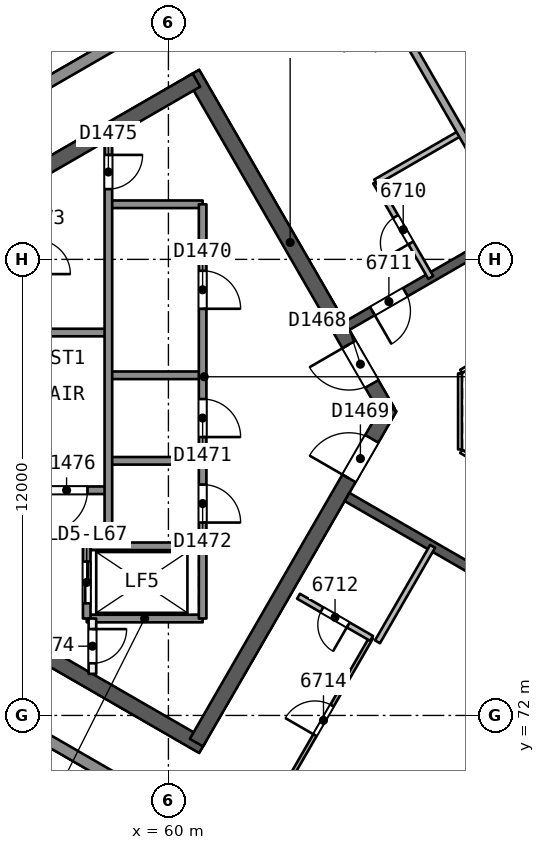
"""IFC4 building model, lengths in metres.
Left out: names, types, materials, properties, quantities, classifications, styles, units other than length and angle.
Written with IfcOpenShell. Run it as: python <this file> out.ifc"""

import sys

from ifc_helpers import new_model, si_unit, direction, frame, frame_2d, origin, place, context, subcontext, project, spatial, rectangle, extrude, element, fill, save


model = new_model("IFC4")
c1 = context("Model", 3, precision=1e-05, world=origin(), true_north=direction((0.0, 1.0)))
c2 = subcontext(c1, "Body", "Model", "MODEL_VIEW")
j1 = project(units=[si_unit("LENGTHUNIT", "METRE"), si_unit("PLANEANGLEUNIT", "RADIAN")], contexts=[c1])
p1 = place(None, origin())
s1 = spatial("IfcSite", under=j1, at=p1, CompositionType="ELEMENT")
p2 = place(p1, origin())
s2 = spatial("IfcBuilding", under=s1, at=p2, CompositionType="ELEMENT")
p3 = place(p2, frame((0.0, 0.0, 273.8)))
s3 = spatial("IfcBuildingStorey", under=s2, at=p3, CompositionType="ELEMENT", Elevation=273.8)
p4 = place(p3, frame((65.769, 80.0, 0.0), z_axis=(0.0, 0.0, 1.0), x_axis=(-0.50000177223, 0.866024380585, 0.0)))
e1 = element("IfcWall", 1, at=p4, inside=s3, PredefinedType="SHEAR", context=c2, shape_type="SweptSolid", body=[
    extrude(rectangle(XDim=10.265, YDim=0.4, at=frame_2d((5.132, 0.0))), origin(), (0.0, 0.0, 1.0), 3.7),
])
p5 = place(p4, frame((0.834, 0.0, 0.0)))
e2 = element("IfcOpeningElement", 2, at=p5, cuts=e1, PredefinedType="OPENING", context=c2, shape_type="SweptSolid", body=[
    extrude(rectangle(XDim=1.2, YDim=2.1, at=frame_2d((0.6, 1.05))), frame((0.0, 0.21, 0.0), z_axis=(0.0, -1.0, 0.0), x_axis=(1.0, 0.0, 0.0)), (0.0, 0.0, 1.0), 0.421),
])
p6 = place(p3, frame((60.737, 88.716, 0.0), z_axis=(0.0, 0.0, 1.0), x_axis=(-0.866028812667, -0.499994095595, 0.0)))
e3 = element("IfcWall", 3, at=p6, inside=s3, PredefinedType="SHEAR", context=c2, shape_type="SweptSolid", body=[
    extrude(rectangle(XDim=14.134, YDim=0.4, at=frame_2d((7.067, 0.0))), origin(), (0.0, 0.0, 1.0), 3.7),
])
p7 = place(p3, frame((48.597, 78.293, 0.0), z_axis=(0.0, 0.0, 1.0), x_axis=(0.866026024469, -0.499998924941, 0.0)))
e4 = element("IfcWall", 4, at=p7, inside=s3, PredefinedType="SHEAR", context=c2, shape_type="SweptSolid", body=[
    extrude(rectangle(XDim=14.218, YDim=0.4, at=frame_2d((7.109, 0.0))), origin(), (0.0, 0.0, 1.0), 3.7),
])
p8 = place(p3, frame((60.737, 71.284, 0.0), z_axis=(0.0, 0.0, 1.0), x_axis=(0.50000547566, 0.866022242388, 0.0)))
e5 = element("IfcWall", 5, at=p8, inside=s3, PredefinedType="SHEAR", context=c2, shape_type="SweptSolid", body=[
    extrude(rectangle(XDim=10.18, YDim=0.4, at=frame_2d((5.09, 0.0))), origin(), (0.0, 0.0, 1.0), 3.7),
])
p9 = place(p8, frame((8.03, 0.0, 0.0)))
e6 = element("IfcOpeningElement", 6, at=p9, cuts=e5, PredefinedType="OPENING", context=c2, shape_type="SweptSolid", body=[
    extrude(rectangle(XDim=1.2, YDim=2.1, at=frame_2d((0.6, 1.05))), frame((0.0, 0.21, 0.0), z_axis=(0.0, -1.0, 0.0), x_axis=(1.0, 0.0, 0.0)), (0.0, 0.0, 1.0), 0.421),
])
p10 = place(p3, frame((78.2, 90.046, 0.0), z_axis=(0.0, 0.0, 1.0), x_axis=(-0.866026492143, -0.499998114903, 0.0)))
e7 = element("IfcWall", 7, at=p10, inside=s3, PredefinedType="SHEAR", context=c2, shape_type="SweptSolid", body=[
    extrude(rectangle(XDim=15.588, YDim=0.25, at=frame_2d((7.794, 0.0))), origin(), (0.0, 0.0, 1.0), 3.3),
])
p11 = place(p10, frame((3.372, 0.0, 0.0)))
e8 = element("IfcOpeningElement", 8, at=p11, cuts=e7, PredefinedType="OPENING", context=c2, shape_type="SweptSolid", body=[
    extrude(rectangle(XDim=1.0, YDim=2.1, at=frame_2d((0.5, 1.05))), frame((0.0, 0.135, 0.0), z_axis=(0.0, -1.0, 0.0), x_axis=(1.0, 0.0, 0.0)), (0.0, 0.0, 1.0), 0.271),
])
p12 = place(p10, frame((8.594, 0.0, 0.0)))
e9 = element("IfcOpeningElement", 9, at=p12, cuts=e7, PredefinedType="OPENING", context=c2, shape_type="SweptSolid", body=[
    extrude(rectangle(XDim=1.0, YDim=2.1, at=frame_2d((0.5, 1.05))), frame((0.0, 0.135, 0.0), z_axis=(0.0, -1.0, 0.0), x_axis=(1.0, 0.0, 0.0)), (0.0, 0.0, 1.0), 0.271),
])
p13 = place(p10, frame((13.816, 0.0, 0.0)))
e10 = element("IfcOpeningElement", 10, at=p13, cuts=e7, PredefinedType="OPENING", context=c2, shape_type="SweptSolid", body=[
    extrude(rectangle(XDim=1.0, YDim=2.1, at=frame_2d((0.5, 1.05))), frame((0.0, 0.135, 0.0), z_axis=(0.0, -1.0, 0.0), x_axis=(1.0, 0.0, 0.0)), (0.0, 0.0, 1.0), 0.271),
])
p14 = place(p3, frame((64.7, 77.748, 0.0), z_axis=(0.0, 0.0, 1.0), x_axis=(0.866026492143, -0.499998114903, 0.0)))
e11 = element("IfcWall", 11, at=p14, inside=s3, PredefinedType="SHEAR", context=c2, shape_type="SweptSolid", body=[
    extrude(rectangle(XDim=15.588, YDim=0.25, at=frame_2d((7.794, 0.0))), origin(), (0.0, 0.0, 1.0), 3.3),
])
p15 = place(p14, frame((4.473, 0.0, 0.0)))
e12 = element("IfcOpeningElement", 12, at=p15, cuts=e11, PredefinedType="OPENING", context=c2, shape_type="SweptSolid", body=[
    extrude(rectangle(XDim=1.0, YDim=2.1, at=frame_2d((0.5, 1.05))), frame((0.0, 0.135, 0.0), z_axis=(0.0, -1.0, 0.0), x_axis=(1.0, 0.0, 0.0)), (0.0, 0.0, 1.0), 0.271),
])
p16 = place(p14, frame((13.917, 0.0, 0.0)))
e13 = element("IfcOpeningElement", 13, at=p16, cuts=e11, PredefinedType="OPENING", context=c2, shape_type="SweptSolid", body=[
    extrude(rectangle(XDim=1.1, YDim=2.1, at=frame_2d((0.55, 1.05))), frame((0.0, 0.135, 0.0), z_axis=(0.0, -1.0, 0.0), x_axis=(1.0, 0.0, 0.0)), (0.0, 0.0, 1.0), 0.271),
])
p17 = place(p3, frame((64.49, 92.903, 0.0), z_axis=(0.0, 0.0, 1.0), x_axis=(0.500006376834, -0.866021722086, 0.0)))
e14 = element("IfcWall", 14, at=p17, inside=s3, PredefinedType="PARTITIONING", context=c2, shape_type="SweptSolid", body=[
    extrude(rectangle(XDim=9.329, YDim=0.2, at=frame_2d((4.665, 0.0))), origin(), (0.0, 0.0, 1.0), 3.3),
])
p18 = place(p3, frame((66.903, 83.524, 0.0), z_axis=(0.0, 0.0, 1.0), x_axis=(-0.499987231761, 0.866032775405, 0.0)))
e15 = element("IfcWall", 15, at=p18, inside=s3, PredefinedType="PARTITIONING", context=c2, shape_type="SweptSolid", body=[
    extrude(rectangle(XDim=2.9, YDim=0.15, at=frame_2d((1.45, 0.0))), origin(), (0.0, 0.0, 1.0), 3.3),
])
p19 = place(p18, frame((1.05, 0.0, 0.0)))
e16 = element("IfcOpeningElement", 16, at=p19, cuts=e15, PredefinedType="OPENING", context=c2, shape_type="SweptSolid", body=[
    extrude(rectangle(XDim=0.8, YDim=2.1, at=frame_2d((0.4, 1.05))), frame((0.0, 0.085, 0.0), z_axis=(0.0, -1.0, 0.0), x_axis=(1.0, 0.0, 0.0)), (0.0, 0.0, 1.0), 0.171),
])
p20 = place(p3, frame((65.453, 86.035, 0.0), z_axis=(0.0, 0.0, 1.0), x_axis=(0.866021400173, 0.500006934395, 0.0)))
e17 = element("IfcWall", 17, at=p20, inside=s3, PredefinedType="PARTITIONING", context=c2, shape_type="SweptSolid", body=[
    extrude(rectangle(XDim=2.6, YDim=0.15, at=frame_2d((1.3, 0.0))), origin(), (0.0, 0.0, 1.0), 3.3),
])
p21 = place(p3, frame((62.116, 68.469, 0.0), z_axis=(0.0, 0.0, 1.0), x_axis=(0.499987977232, 0.866032345022, 0.0)))
e18 = element("IfcWall", 18, at=p21, inside=s3, PredefinedType="PARTITIONING", context=c2, shape_type="SweptSolid", body=[
    extrude(rectangle(XDim=6.447, YDim=0.1, at=frame_2d((3.224, 0.0))), origin(), (0.0, 0.0, 1.0), 3.3),
])
p22 = place(p21, frame((3.478, 0.0, 0.0)))
e19 = element("IfcOpeningElement", 19, at=p22, cuts=e18, PredefinedType="OPENING", context=c2, shape_type="SweptSolid", body=[
    extrude(rectangle(XDim=0.9, YDim=2.1, at=frame_2d((0.45, 1.05))), frame((0.0, 0.061, 0.0), z_axis=(0.0, -1.0, 0.0), x_axis=(1.0, 0.0, 0.0)), (0.0, 0.0, 1.0), 0.121),
])
p23 = place(p3, frame((65.347, 74.026, 0.0), z_axis=(0.0, 0.0, 1.0), x_axis=(-0.866042797968, 0.49996987118, 0.0)))
e20 = element("IfcWall", 20, at=p23, inside=s3, PredefinedType="PARTITIONING", context=c2, shape_type="SweptSolid", body=[
    extrude(rectangle(XDim=2.221, YDim=0.15, at=frame_2d((1.11, 0.0))), origin(), (0.0, 0.0, 1.0), 3.3),
])
p24 = place(p23, frame((0.711, 0.0, 0.0)))
e21 = element("IfcOpeningElement", 21, at=p24, cuts=e20, PredefinedType="OPENING", context=c2, shape_type="SweptSolid", body=[
    extrude(rectangle(XDim=0.8, YDim=2.1, at=frame_2d((0.4, 1.05))), frame((0.0, 0.085, 0.0), z_axis=(0.0, -1.0, 0.0), x_axis=(1.0, 0.0, 0.0)), (0.0, 0.0, 1.0), 0.171),
])
p25 = place(p3, frame((66.952, 76.448, 0.0), z_axis=(0.0, 0.0, 1.0), x_axis=(-0.499987231761, -0.866032775405, 0.0)))
e22 = element("IfcWall", 22, at=p25, inside=s3, PredefinedType="PARTITIONING", context=c2, shape_type="SweptSolid", body=[
    extrude(rectangle(XDim=2.9, YDim=0.15, at=frame_2d((1.45, 0.0))), origin(), (0.0, 0.0, 1.0), 3.3),
])
p26 = place(p3, frame((46.067, 82.438, 0.0), z_axis=(0.0, 0.0, 1.0), x_axis=(0.866024153303, 0.50000216589, 0.0)))
e23 = element("IfcWall", 23, at=p26, inside=s3, PredefinedType="SOLIDWALL", context=c2, shape_type="SweptSolid", body=[
    extrude(rectangle(XDim=47.675, YDim=0.3, at=frame_2d((23.837, 0.0))), origin(), (0.0, 0.0, 1.0), 3.3),
])
p27 = place(p26, frame((17.415, 0.0, 0.0)))
e24 = element("IfcOpeningElement", 24, at=p27, cuts=e23, PredefinedType="OPENING", context=c2, shape_type="SweptSolid", body=[
    extrude(rectangle(XDim=2.4, YDim=2.4, at=frame_2d((1.2, 1.2))), frame((0.0, 0.161, 0.0), z_axis=(0.0, -1.0, 0.0), x_axis=(1.0, 0.0, 0.0)), (0.0, 0.0, 1.0), 0.321),
])
p28 = place(p26, frame((22.637, 0.0, 0.0)))
e25 = element("IfcOpeningElement", 25, at=p28, cuts=e23, PredefinedType="OPENING", context=c2, shape_type="SweptSolid", body=[
    extrude(rectangle(XDim=2.4, YDim=2.4, at=frame_2d((1.2, 1.2))), frame((0.0, 0.161, 0.0), z_axis=(0.0, -1.0, 0.0), x_axis=(1.0, 0.0, 0.0)), (0.0, 0.0, 1.0), 0.321),
])
p29 = place(p26, frame((27.859, 0.0, 0.0)))
e26 = element("IfcOpeningElement", 26, at=p29, cuts=e23, PredefinedType="OPENING", context=c2, shape_type="SweptSolid", body=[
    extrude(rectangle(XDim=2.4, YDim=2.4, at=frame_2d((1.2, 1.2))), frame((0.0, 0.161, 0.0), z_axis=(0.0, -1.0, 0.0), x_axis=(1.0, 0.0, 0.0)), (0.0, 0.0, 1.0), 0.321),
])
p30 = place(p3, frame((87.355, 53.724, 0.0), z_axis=(0.0, 0.0, 1.0), x_axis=(-0.866024153303, 0.50000216589, 0.0)))
e27 = element("IfcWall", 27, at=p30, inside=s3, PredefinedType="SOLIDWALL", context=c2, shape_type="SweptSolid", body=[
    extrude(rectangle(XDim=47.675, YDim=0.3, at=frame_2d((23.837, 0.0))), origin(), (0.0, 0.0, 1.0), 3.3),
])
p31 = place(p30, frame((17.415, 0.0, 0.0)))
e28 = element("IfcOpeningElement", 28, at=p31, cuts=e27, PredefinedType="OPENING", context=c2, shape_type="SweptSolid", body=[
    extrude(rectangle(XDim=2.4, YDim=2.4, at=frame_2d((1.2, 1.2))), frame((0.0, 0.161, 0.0), z_axis=(0.0, -1.0, 0.0), x_axis=(1.0, 0.0, 0.0)), (0.0, 0.0, 1.0), 0.321),
])
p32 = place(p30, frame((37.296, 0.0, 0.0)))
e29 = element("IfcOpeningElement", 29, at=p32, cuts=e27, PredefinedType="OPENING", context=c2, shape_type="SweptSolid", body=[
    extrude(rectangle(XDim=2.4, YDim=2.4, at=frame_2d((1.2, 1.2))), frame((0.0, 0.161, 0.0), z_axis=(0.0, -1.0, 0.0), x_axis=(1.0, 0.0, 0.0)), (0.0, 0.0, 1.0), 0.321),
])
p33 = place(p30, frame((24.008, 0.0, 0.0)))
e30 = element("IfcOpeningElement", 30, at=p33, cuts=e27, PredefinedType="OPENING", context=c2, shape_type="SweptSolid", body=[
    extrude(rectangle(XDim=2.4, YDim=2.4, at=frame_2d((1.2, 1.2))), frame((0.0, 0.161, 0.0), z_axis=(0.0, -1.0, 0.0), x_axis=(1.0, 0.0, 0.0)), (0.0, 0.0, 1.0), 0.321),
])
p34 = place(p3, frame((60.9, 85.45, 0.0), z_axis=(0.0, 0.0, 1.0), x_axis=(-1.0, 0.0, 0.0)))
e31 = element("IfcWall", 31, at=p34, inside=s3, PredefinedType="SOLIDWALL", context=c2, shape_type="SweptSolid", body=[
    extrude(rectangle(XDim=2.48, YDim=0.2, at=frame_2d((1.24, 0.0))), origin(), (0.0, 0.0, 1.0), 3.3),
])
p35 = place(p3, frame((58.42, 82.075, 0.0), z_axis=(0.0, 0.0, 1.0), x_axis=(-1.0, 0.0, 0.0)))
e32 = element("IfcWall", 32, at=p35, inside=s3, PredefinedType="SOLIDWALL", context=c2, shape_type="SweptSolid", body=[
    extrude(rectangle(XDim=7.7, YDim=0.2, at=frame_2d((3.85, 0.0))), origin(), (0.0, 0.0, 1.0), 3.3),
])
for number, where, z_axis, x_axis in (
    (33, (60.9, 80.95, 0.0), (0.0, 0.0, 1.0), (-1.0, 0.0, 0.0)),
    (34, (60.9, 78.7, 0.0), (0.0, 0.0, 1.0), (-1.0, 0.0, 0.0)),
):
    element("IfcWall", number, at=place(p3, frame(where, z_axis=z_axis, x_axis=x_axis)), inside=s3, PredefinedType="SOLIDWALL", context=c2, shape_type="SweptSolid", body=[
        extrude(rectangle(XDim=2.48, YDim=0.2, at=frame_2d((1.24, 0.0))), origin(), (0.0, 0.0, 1.0), 3.3),
    ])
p36 = place(p3, frame((58.42, 77.925, 0.0), z_axis=(0.0, 0.0, 1.0), x_axis=(-1.0, 0.0, 0.0)))
e35 = element("IfcWall", 35, at=p36, inside=s3, PredefinedType="SOLIDWALL", context=c2, shape_type="SweptSolid", body=[
    extrude(rectangle(XDim=7.7, YDim=0.2, at=frame_2d((3.85, 0.0))), origin(), (0.0, 0.0, 1.0), 3.3),
])
p37 = place(p36, frame((0.55, 0.0, 0.0)))
e36 = element("IfcOpeningElement", 36, at=p37, cuts=e35, PredefinedType="OPENING", context=c2, shape_type="SweptSolid", body=[
    extrude(rectangle(XDim=1.1, YDim=2.1, at=frame_2d((0.55, 1.05))), frame((0.0, 0.11, 0.0), z_axis=(0.0, -1.0, 0.0), x_axis=(1.0, 0.0, 0.0)), (0.0, 0.0, 1.0), 0.221),
])
for number, where, z_axis, x_axis in (
    (37, (60.9, 76.45, 0.0), (0.0, 0.0, 1.0), (-1.0, 0.0, 0.0)),
    (38, (60.9, 74.55, 0.0), (0.0, 0.0, 1.0), (-1.0, 0.0, 0.0)),
):
    element("IfcWall", number, at=place(p3, frame(where, z_axis=z_axis, x_axis=x_axis)), inside=s3, PredefinedType="SOLIDWALL", context=c2, shape_type="SweptSolid", body=[
        extrude(rectangle(XDim=3.05, YDim=0.2, at=frame_2d((1.525, 0.0))), origin(), (0.0, 0.0, 1.0), 3.3),
    ])
p38 = place(p3, frame((60.9, 85.45, 0.0), z_axis=(0.0, 0.0, 1.0), x_axis=(0.0, -1.0, 0.0)))
e39 = element("IfcWall", 39, at=p38, inside=s3, PredefinedType="SOLIDWALL", context=c2, shape_type="SweptSolid", body=[
    extrude(rectangle(XDim=10.9, YDim=0.2, at=frame_2d((5.45, 0.0))), origin(), (0.0, 0.0, 1.0), 3.3),
])
p39 = place(p38, frame((1.75, 0.0, 0.0)))
e40 = element("IfcOpeningElement", 40, at=p39, cuts=e39, PredefinedType="OPENING", context=c2, shape_type="SweptSolid", body=[
    extrude(rectangle(XDim=1.0, YDim=2.1, at=frame_2d((0.5, 1.05))), frame((0.0, 0.11, 0.0), z_axis=(0.0, -1.0, 0.0), x_axis=(1.0, 0.0, 0.0)), (0.0, 0.0, 1.0), 0.221),
])
p40 = place(p38, frame((5.125, 0.0, 0.0)))
e41 = element("IfcOpeningElement", 41, at=p40, cuts=e39, PredefinedType="OPENING", context=c2, shape_type="SweptSolid", body=[
    extrude(rectangle(XDim=1.0, YDim=2.1, at=frame_2d((0.5, 1.05))), frame((0.0, 0.11, 0.0), z_axis=(0.0, -1.0, 0.0), x_axis=(1.0, 0.0, 0.0)), (0.0, 0.0, 1.0), 0.221),
])
p41 = place(p38, frame((7.375, 0.0, 0.0)))
e42 = element("IfcOpeningElement", 42, at=p41, cuts=e39, PredefinedType="OPENING", context=c2, shape_type="SweptSolid", body=[
    extrude(rectangle(XDim=1.0, YDim=2.1, at=frame_2d((0.5, 1.05))), frame((0.0, 0.11, 0.0), z_axis=(0.0, -1.0, 0.0), x_axis=(1.0, 0.0, 0.0)), (0.0, 0.0, 1.0), 0.221),
])
p42 = place(p3, frame((58.42, 87.148, 0.0), z_axis=(0.0, 0.0, 1.0), x_axis=(0.0, -1.0, 0.0)))
e43 = element("IfcWall", 43, at=p42, inside=s3, PredefinedType="SOLIDWALL", context=c2, shape_type="SweptSolid", body=[
    extrude(rectangle(XDim=10.698, YDim=0.2, at=frame_2d((5.349, 0.0))), origin(), (0.0, 0.0, 1.0), 3.3),
])
p43 = place(p42, frame((0.399, 0.0, 0.0)))
e44 = element("IfcOpeningElement", 44, at=p43, cuts=e43, PredefinedType="OPENING", context=c2, shape_type="SweptSolid", body=[
    extrude(rectangle(XDim=0.9, YDim=2.1, at=frame_2d((0.45, 1.05))), frame((0.0, 0.11, 0.0), z_axis=(0.0, -1.0, 0.0), x_axis=(1.0, 0.0, 0.0)), (0.0, 0.0, 1.0), 0.221),
])
p44 = place(p3, frame((58.0, 74.55, 0.0), z_axis=(0.0, 0.0, 1.0), x_axis=(0.0, -1.0, 0.0)))
e45 = element("IfcWall", 45, at=p44, inside=s3, PredefinedType="PARTITIONING", context=c2, shape_type="SweptSolid", body=[
    extrude(rectangle(XDim=1.455, YDim=0.2, at=frame_2d((0.728, 0.0))), origin(), (0.0, 0.0, 1.0), 3.3),
])
p45 = place(p44, frame((0.278, 0.0, 0.0)))
e46 = element("IfcOpeningElement", 46, at=p45, cuts=e45, PredefinedType="OPENING", context=c2, shape_type="SweptSolid", body=[
    extrude(rectangle(XDim=0.9, YDim=2.1, at=frame_2d((0.45, 1.05))), frame((0.0, 0.11, 0.0), z_axis=(0.0, -1.0, 0.0), x_axis=(1.0, 0.0, 0.0)), (0.0, 0.0, 1.0), 0.221),
])
p46 = place(p3, frame((57.85, 76.45, 0.0), z_axis=(0.0, 0.0, 1.0), x_axis=(0.0, -1.0, 0.0)))
e47 = element("IfcWall", 47, at=p46, inside=s3, PredefinedType="SOLIDWALL", context=c2, shape_type="SweptSolid", body=[
    extrude(rectangle(XDim=1.9, YDim=0.2, at=frame_2d((0.95, 0.0))), origin(), (0.0, 0.0, 1.0), 3.3),
])
p47 = place(p46, frame((0.4, 0.0, 0.0)))
e48 = element("IfcOpeningElement", 48, at=p47, cuts=e47, PredefinedType="OPENING", context=c2, shape_type="SweptSolid", body=[
    extrude(rectangle(XDim=1.1, YDim=2.1, at=frame_2d((0.55, 1.05))), frame((0.0, 0.11, 0.0), z_axis=(0.0, -1.0, 0.0), x_axis=(1.0, 0.0, 0.0)), (0.0, 0.0, 1.0), 0.221),
])
p48 = place(p3, frame((77.738, 86.846, 0.0), z_axis=(0.0, 0.0, 1.0), x_axis=(-0.866026658274, -0.499997827154, 0.0)))
e49 = element("IfcWall", 49, at=p48, inside=s3, PredefinedType="PARTITIONING", context=c2, shape_type="SweptSolid", body=[
    extrude(rectangle(XDim=11.588, YDim=0.1, at=frame_2d((5.794, 0.0))), origin(), (0.0, 0.0, 1.0), 3.3),
])
p49 = place(p3, frame((67.672, 81.0, 0.0), z_axis=(0.0, 0.0, 1.0), x_axis=(0.0, -1.0, 0.0)))
e50 = element("IfcWall", 50, at=p49, inside=s3, PredefinedType="PARTITIONING", context=c2, shape_type="SweptSolid", body=[
    extrude(rectangle(XDim=2.0, YDim=0.1, at=frame_2d((1.0, 0.0))), origin(), (0.0, 0.0, 1.0), 3.3),
])
p50 = place(p3, frame((67.702, 78.948, 0.0), z_axis=(0.0, 0.0, 1.0), x_axis=(0.866026658274, -0.499997827154, 0.0)))
e51 = element("IfcWall", 51, at=p50, inside=s3, PredefinedType="PARTITIONING", context=c2, shape_type="SweptSolid", body=[
    extrude(rectangle(XDim=11.588, YDim=0.1, at=frame_2d((5.794, 0.0))), origin(), (0.0, 0.0, 1.0), 3.3),
])
p51 = place(p19, origin())
e52 = element("IfcDoor", 52, at=p51, inside=s3, OperationType="SINGLE_SWING_LEFT", PredefinedType="NOTDEFINED", context=c2, shape_type="SweptSolid", body=[
    extrude(rectangle(XDim=0.8, YDim=2.1, at=frame_2d((0.4, 1.05))), frame((0.0, 0.025, 0.0), z_axis=(0.0, -1.0, 0.0), x_axis=(1.0, 0.0, 0.0)), (0.0, 0.0, 1.0), 0.05),
])
fill(e16, e52)
p52 = place(p13, origin())
e53 = element("IfcDoor", 53, at=p52, inside=s3, OperationType="SINGLE_SWING_RIGHT", PredefinedType="NOTDEFINED", context=c2, shape_type="SweptSolid", body=[
    extrude(rectangle(XDim=1.0, YDim=2.1, at=frame_2d((0.5, 1.05))), frame((0.0, 0.025, 0.0), z_axis=(0.0, -1.0, 0.0), x_axis=(1.0, 0.0, 0.0)), (0.0, 0.0, 1.0), 0.05),
])
fill(e10, e53)
p53 = place(p24, origin())
e54 = element("IfcDoor", 54, at=p53, inside=s3, OperationType="SINGLE_SWING_LEFT", PredefinedType="NOTDEFINED", context=c2, shape_type="SweptSolid", body=[
    extrude(rectangle(XDim=0.8, YDim=2.1, at=frame_2d((0.4, 1.05))), frame((0.0, 0.025, 0.0), z_axis=(0.0, -1.0, 0.0), x_axis=(1.0, 0.0, 0.0)), (0.0, 0.0, 1.0), 0.05),
])
fill(e21, e54)
p54 = place(p22, origin())
e55 = element("IfcDoor", 55, at=p54, inside=s3, OperationType="SINGLE_SWING_LEFT", PredefinedType="NOTDEFINED", context=c2, shape_type="SweptSolid", body=[
    extrude(rectangle(XDim=0.9, YDim=2.1, at=frame_2d((0.45, 1.05))), frame((0.0, 0.025, 0.0), z_axis=(0.0, -1.0, 0.0), x_axis=(1.0, 0.0, 0.0)), (0.0, 0.0, 1.0), 0.05),
])
fill(e19, e55)
p55 = place(p5, origin())
e56 = element("IfcDoor", 56, at=p55, inside=s3, OperationType="SINGLE_SWING_RIGHT", PredefinedType="NOTDEFINED", context=c2, shape_type="SweptSolid", body=[
    extrude(rectangle(XDim=1.2, YDim=2.1, at=frame_2d((0.6, 1.05))), frame((0.0, 0.025, 0.0), z_axis=(0.0, -1.0, 0.0), x_axis=(1.0, 0.0, 0.0)), (0.0, 0.0, 1.0), 0.05),
])
fill(e2, e56)
p56 = place(p9, origin())
e57 = element("IfcDoor", 57, at=p56, inside=s3, OperationType="SINGLE_SWING_LEFT", PredefinedType="NOTDEFINED", context=c2, shape_type="SweptSolid", body=[
    extrude(rectangle(XDim=1.2, YDim=2.1, at=frame_2d((0.6, 1.05))), frame((0.0, 0.025, 0.0), z_axis=(0.0, -1.0, 0.0), x_axis=(1.0, 0.0, 0.0)), (0.0, 0.0, 1.0), 0.05),
])
fill(e6, e57)
p57 = place(p47, origin())
e58 = element("IfcDoor", 58, at=p57, inside=s3, OperationType="SLIDING_TO_RIGHT", PredefinedType="NOTDEFINED", context=c2, shape_type="SweptSolid", body=[
    extrude(rectangle(XDim=1.1, YDim=2.1, at=frame_2d((0.55, 1.05))), frame((0.0, 0.025, 0.0), z_axis=(0.0, -1.0, 0.0), x_axis=(1.0, 0.0, 0.0)), (0.0, 0.0, 1.0), 0.05),
])
fill(e48, e58)
p58 = place(p39, origin())
e59 = element("IfcDoor", 59, at=p58, inside=s3, OperationType="SINGLE_SWING_RIGHT", PredefinedType="NOTDEFINED", context=c2, shape_type="SweptSolid", body=[
    extrude(rectangle(XDim=1.0, YDim=2.1, at=frame_2d((0.5, 1.05))), frame((0.0, 0.025, 0.0), z_axis=(0.0, -1.0, 0.0), x_axis=(1.0, 0.0, 0.0)), (0.0, 0.0, 1.0), 0.05),
])
fill(e40, e59)
p59 = place(p40, origin())
e60 = element("IfcDoor", 60, at=p59, inside=s3, OperationType="SINGLE_SWING_RIGHT", PredefinedType="NOTDEFINED", context=c2, shape_type="SweptSolid", body=[
    extrude(rectangle(XDim=1.0, YDim=2.1, at=frame_2d((0.5, 1.05))), frame((0.0, 0.025, 0.0), z_axis=(0.0, -1.0, 0.0), x_axis=(1.0, 0.0, 0.0)), (0.0, 0.0, 1.0), 0.05),
])
fill(e41, e60)
p60 = place(p41, origin())
e61 = element("IfcDoor", 61, at=p60, inside=s3, OperationType="SINGLE_SWING_RIGHT", PredefinedType="NOTDEFINED", context=c2, shape_type="SweptSolid", body=[
    extrude(rectangle(XDim=1.0, YDim=2.1, at=frame_2d((0.5, 1.05))), frame((0.0, 0.025, 0.0), z_axis=(0.0, -1.0, 0.0), x_axis=(1.0, 0.0, 0.0)), (0.0, 0.0, 1.0), 0.05),
])
fill(e42, e61)
p61 = place(p45, origin())
e62 = element("IfcDoor", 62, at=p61, inside=s3, OperationType="SINGLE_SWING_LEFT", PredefinedType="NOTDEFINED", context=c2, shape_type="SweptSolid", body=[
    extrude(rectangle(XDim=0.9, YDim=2.1, at=frame_2d((0.45, 1.05))), frame((0.0, 0.025, 0.0), z_axis=(0.0, -1.0, 0.0), x_axis=(1.0, 0.0, 0.0)), (0.0, 0.0, 1.0), 0.05),
])
fill(e46, e62)
p62 = place(p43, origin())
e63 = element("IfcDoor", 63, at=p62, inside=s3, OperationType="SINGLE_SWING_LEFT", PredefinedType="NOTDEFINED", context=c2, shape_type="SweptSolid", body=[
    extrude(rectangle(XDim=0.9, YDim=2.1, at=frame_2d((0.45, 1.05))), frame((0.0, 0.025, 0.0), z_axis=(0.0, -1.0, 0.0), x_axis=(1.0, 0.0, 0.0)), (0.0, 0.0, 1.0), 0.05),
])
fill(e44, e63)
p63 = place(p37, origin())
e64 = element("IfcDoor", 64, at=p63, inside=s3, OperationType="SINGLE_SWING_RIGHT", PredefinedType="NOTDEFINED", context=c2, shape_type="SweptSolid", body=[
    extrude(rectangle(XDim=1.1, YDim=2.1, at=frame_2d((0.55, 1.05))), frame((0.0, 0.025, 0.0), z_axis=(0.0, -1.0, 0.0), x_axis=(1.0, 0.0, 0.0)), (0.0, 0.0, 1.0), 0.05),
])
fill(e36, e64)
save(model, sys.argv[1])
